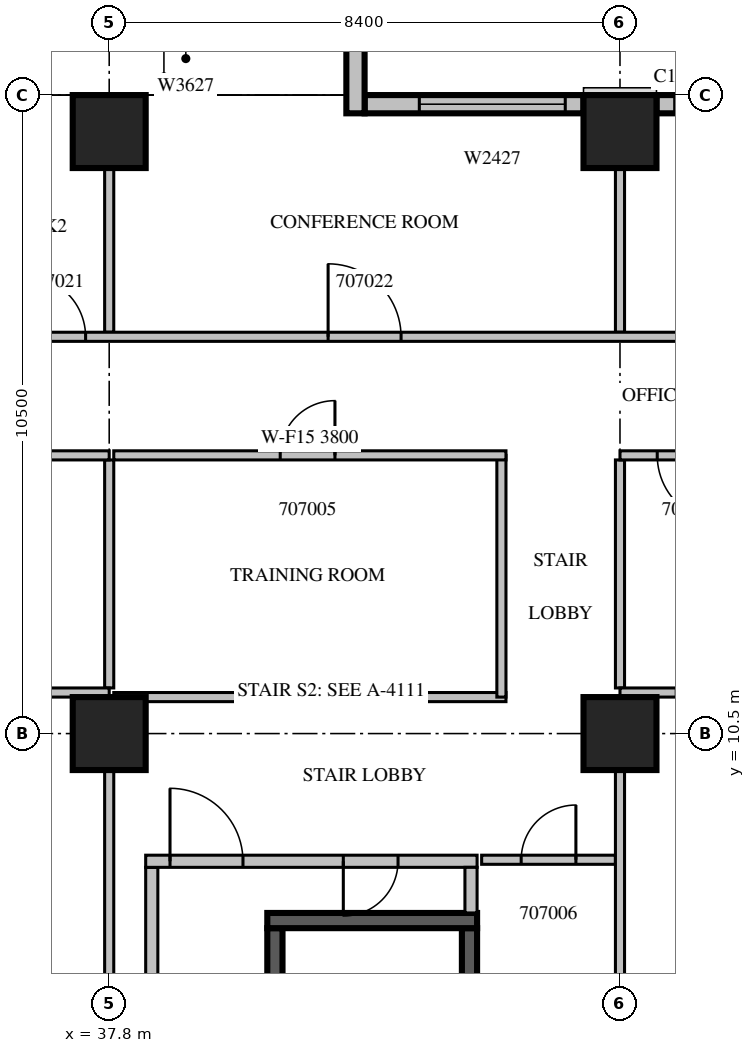
"""IFC4 building model, lengths in metres.
Left out: names, types, materials, properties, quantities, classifications, styles, units other than length and angle.
Written with IfcOpenShell. Run it as: python <this file> out.ifc"""

import sys

from ifc_helpers import new_model, si_unit, direction, frame, frame_2d, origin, origin_2d, place, context, subcontext, project, spatial, rectangle, extrude, source, transform, mapped, element, fill, save


model = new_model("IFC4")
c1 = context("Model", 3, precision=1e-05, world=origin(), true_north=direction((0.0, 1.0)))
c2 = subcontext(c1, "Body", "Model", "MODEL_VIEW")
j1 = project(units=[si_unit("LENGTHUNIT", "METRE"), si_unit("PLANEANGLEUNIT", "RADIAN")], contexts=[c1])
p1 = place(None, origin())
s1 = spatial("IfcSite", under=j1, at=p1, CompositionType="ELEMENT")
p2 = place(p1, origin())
s2 = spatial("IfcBuilding", under=s1, at=p2, CompositionType="ELEMENT")
p3 = place(p2, frame((0.0, 0.0, 40.5)))
s3 = spatial("IfcBuildingStorey", under=s2, at=p3, CompositionType="ELEMENT", Elevation=40.5)
m1 = source(origin(), c2, "Body", "SweptSolid", [
    extrude(rectangle(XDim=1.2, YDim=1.2, at=origin_2d()), origin(), (0.0, 0.0, 1.0), 4.2),
])
for number, where, z_axis, x_axis in (
    (1, (37.8, 10.5, 0.0), (0.0, 0.0, 1.0), (1.0, 0.0, 0.0)),
    (2, (46.2, 10.5, 0.0), (0.0, 0.0, 1.0), (1.0, 0.0, 0.0)),
    (3, (37.8, 20.4, 0.0), (0.0, 0.0, 1.0), (1.0, 0.0, 0.0)),
    (4, (46.2, 20.4, 0.0), (0.0, 0.0, 1.0), (1.0, 0.0, 0.0)),
):
    element("IfcColumn", number, at=place(p3, frame(where, z_axis=z_axis, x_axis=x_axis)), inside=s3, PredefinedType="COLUMN", context=c2, shape_type="MappedRepresentation", body=[
        mapped(m1, transform((0.0, 0.0, 0.0), scale=1.0)),
    ])
m2 = source(origin(), c2, "Body", "SweptSolid", [
    extrude(rectangle(XDim=4.68, YDim=0.3, at=frame_2d((2.34, 0.0))), origin(), (0.0, 0.0, 1.0), 3.8),
])
p4 = place(p3, frame((51.48, 20.85, 0.0), z_axis=(0.0, 0.0, 1.0), x_axis=(-1.0, 0.0, 0.0)))
e5 = element("IfcWall", 5, at=p4, inside=s3, PredefinedType="STANDARD", context=c2, shape_type="MappedRepresentation", body=[
    mapped(m2, transform((0.0, 0.0, 0.0), scale=1.0)),
])
m3 = source(origin(), c2, "Body", "SweptSolid", [
    extrude(rectangle(XDim=2.4, YDim=2.7, at=frame_2d((1.2, 1.35))), frame((0.0, 0.16, 0.0), z_axis=(0.0, -1.0, 0.0), x_axis=(1.0, 0.0, 0.0)), (0.0, 0.0, 1.0), 0.32),
])
p5 = place(p4, frame((1.98, 0.0, 0.6)))
e6 = element("IfcOpeningElement", 6, at=p5, cuts=e5, PredefinedType="OPENING", context=c2, shape_type="MappedRepresentation", body=[
    mapped(m3, transform((0.0, 0.0, 0.0), scale=1.0)),
])
p6 = place(p3, frame((45.6, 20.85, 0.0), z_axis=(0.0, 0.0, 1.0), x_axis=(-1.0, 0.0, 0.0)))
e7 = element("IfcWall", 7, at=p6, inside=s3, PredefinedType="STANDARD", context=c2, shape_type="SweptSolid", body=[
    extrude(rectangle(XDim=3.6, YDim=0.3, at=frame_2d((1.8, 0.0))), origin(), (0.0, 0.0, 1.0), 3.8),
])
p7 = place(p6, frame((0.3, 0.0, 0.6)))
e8 = element("IfcOpeningElement", 8, at=p7, cuts=e7, PredefinedType="OPENING", context=c2, shape_type="MappedRepresentation", body=[
    mapped(m3, transform((0.0, 0.0, 0.0), scale=1.0)),
])
m4 = source(origin(), c2, "Body", "SweptSolid", [
    extrude(rectangle(XDim=1.2, YDim=0.3, at=frame_2d((0.6, 0.0))), origin(), (0.0, 0.0, 1.0), 3.8),
])
p8 = place(p3, frame((41.85, 20.7, 0.0), z_axis=(0.0, 0.0, 1.0), x_axis=(0.0, 1.0, 0.0)))
e9 = element("IfcWall", 9, at=p8, inside=s3, PredefinedType="STANDARD", context=c2, shape_type="MappedRepresentation", body=[
    mapped(m4, transform((0.0, 0.0, 0.0), scale=1.0)),
])
p9 = place(p3, frame((40.525, 0.3, 0.0), z_axis=(0.0, 0.0, 1.0), x_axis=(0.0, 1.0, 0.0)))
e10 = element("IfcWall", 10, at=p9, inside=s3, PredefinedType="SOLIDWALL", context=c2, shape_type="SweptSolid", body=[
    extrude(rectangle(XDim=7.0, YDim=0.25, at=frame_2d((3.5, 0.0))), origin(), (0.0, 0.0, 1.0), 3.8),
])
m5 = source(origin(), c2, "Body", "SweptSolid", [
    extrude(rectangle(XDim=1.1, YDim=2.1, at=frame_2d((0.55, 1.05))), frame((0.0, 0.135, 0.0), z_axis=(0.0, -1.0, 0.0), x_axis=(1.0, 0.0, 0.0)), (0.0, 0.0, 1.0), 0.27),
])
p10 = place(p9, frame((0.55, 0.0, 0.0)))
e11 = element("IfcOpeningElement", 11, at=p10, cuts=e10, PredefinedType="OPENING", context=c2, shape_type="MappedRepresentation", body=[
    mapped(m5, transform((0.0, 0.0, 0.0), scale=1.0)),
])
m6 = source(origin(), c2, "Body", "SweptSolid", [
    extrude(rectangle(XDim=7.0, YDim=0.25, at=frame_2d((3.5, 0.0))), origin(), (0.0, 0.0, 1.0), 3.8),
])
p11 = place(p3, frame((43.725, 0.3, 0.0), z_axis=(0.0, 0.0, 1.0), x_axis=(0.0, 1.0, 0.0)))
e12 = element("IfcWall", 12, at=p11, inside=s3, PredefinedType="SOLIDWALL", context=c2, shape_type="MappedRepresentation", body=[
    mapped(m6, transform((0.0, 0.0, 0.0), scale=1.0)),
])
p12 = place(p3, frame((40.4, 7.425, 0.0), z_axis=(0.0, 0.0, 1.0), x_axis=(1.0, 0.0, 0.0)))
e13 = element("IfcWall", 13, at=p12, inside=s3, PredefinedType="SOLIDWALL", context=c2, shape_type="SweptSolid", body=[
    extrude(rectangle(XDim=3.45, YDim=0.25, at=frame_2d((1.725, 0.0))), origin(), (0.0, 0.0, 1.0), 3.8),
])
p13 = place(p3, frame((38.5, 0.3, 0.0), z_axis=(0.0, 0.0, 1.0), x_axis=(0.0, 1.0, 0.0)))
e14 = element("IfcWall", 14, at=p13, inside=s3, PredefinedType="PARTITIONING", context=c2, shape_type="SweptSolid", body=[
    extrude(rectangle(XDim=8.0, YDim=0.2, at=frame_2d((4.0, 0.0))), origin(), (0.0, 0.0, 1.0), 3.8),
])
p14 = place(p3, frame((38.4, 8.4, 0.0), z_axis=(0.0, 0.0, 1.0), x_axis=(1.0, 0.0, 0.0)))
e15 = element("IfcWall", 15, at=p14, inside=s3, PredefinedType="PARTITIONING", context=c2, shape_type="SweptSolid", body=[
    extrude(rectangle(XDim=5.45, YDim=0.2, at=frame_2d((2.725, 0.0))), origin(), (0.0, 0.0, 1.0), 3.8),
])
m7 = source(origin(), c2, "Body", "SweptSolid", [
    extrude(rectangle(XDim=1.2, YDim=2.1, at=frame_2d((0.6, 1.05))), frame((0.0, 0.11, 0.0), z_axis=(0.0, -1.0, 0.0), x_axis=(1.0, 0.0, 0.0)), (0.0, 0.0, 1.0), 0.22),
])
p15 = place(p14, frame((0.4, 0.0, 0.0)))
e16 = element("IfcOpeningElement", 16, at=p15, cuts=e15, PredefinedType="OPENING", context=c2, shape_type="MappedRepresentation", body=[
    mapped(m7, transform((0.0, 0.0, 0.0), scale=1.0)),
])
m8 = source(origin(), c2, "Body", "SweptSolid", [
    extrude(rectangle(XDim=0.9, YDim=2.1, at=frame_2d((0.45, 1.05))), frame((0.0, 0.11, 0.0), z_axis=(0.0, -1.0, 0.0), x_axis=(1.0, 0.0, 0.0)), (0.0, 0.0, 1.0), 0.22),
])
p16 = place(p14, frame((3.25, 0.0, 0.0)))
e17 = element("IfcOpeningElement", 17, at=p16, cuts=e15, PredefinedType="OPENING", context=c2, shape_type="MappedRepresentation", body=[
    mapped(m8, transform((0.0, 0.0, 0.0), scale=1.0)),
])
p17 = place(p3, frame((43.75, 7.55, 0.0), z_axis=(0.0, 0.0, 1.0), x_axis=(0.0, 1.0, 0.0)))
e18 = element("IfcWall", 18, at=p17, inside=s3, PredefinedType="PARTITIONING", context=c2, shape_type="SweptSolid", body=[
    extrude(rectangle(XDim=0.75, YDim=0.2, at=frame_2d((0.375, 0.0))), origin(), (0.0, 0.0, 1.0), 3.8),
])
p18 = place(p3, frame((37.875, 11.1, 0.0), z_axis=(0.0, 0.0, 1.0), x_axis=(1.0, 0.0, 0.0)))
e19 = element("IfcWall", 19, at=p18, inside=s3, PredefinedType="PARTITIONING", context=c2, shape_type="SweptSolid", body=[
    extrude(rectangle(XDim=6.45, YDim=0.15, at=frame_2d((3.225, 0.0))), origin(), (0.0, 0.0, 1.0), 3.8),
])
p19 = place(p3, frame((44.25, 11.1, 0.0), z_axis=(0.0, 0.0, 1.0), x_axis=(0.0, 1.0, 0.0)))
e20 = element("IfcWall", 20, at=p19, inside=s3, PredefinedType="PARTITIONING", context=c2, shape_type="SweptSolid", body=[
    extrude(rectangle(XDim=3.975, YDim=0.15, at=frame_2d((1.988, 0.0))), origin(), (0.0, 0.0, 1.0), 3.8),
])
m9 = source(origin(), c2, "Body", "SweptSolid", [
    extrude(rectangle(XDim=6.45, YDim=0.15, at=frame_2d((3.225, 0.0))), origin(), (0.0, 0.0, 1.0), 3.8),
])
p20 = place(p3, frame((44.325, 15.075, 0.0), z_axis=(0.0, 0.0, 1.0), x_axis=(-1.0, 0.0, 0.0)))
e21 = element("IfcWall", 21, at=p20, inside=s3, PredefinedType="PARTITIONING", context=c2, shape_type="MappedRepresentation", body=[
    mapped(m9, transform((0.0, 0.0, 0.0), scale=1.0)),
])
m10 = source(origin(), c2, "Body", "SweptSolid", [
    extrude(rectangle(XDim=0.9, YDim=2.1, at=frame_2d((0.45, 1.05))), frame((0.0, 0.085, 0.0), z_axis=(0.0, -1.0, 0.0), x_axis=(1.0, 0.0, 0.0)), (0.0, 0.0, 1.0), 0.17),
])
p21 = place(p20, frame((2.812, 0.0, 0.0)))
e22 = element("IfcOpeningElement", 22, at=p21, cuts=e21, PredefinedType="OPENING", context=c2, shape_type="MappedRepresentation", body=[
    mapped(m10, transform((0.0, 0.0, 0.0), scale=1.0)),
])
p22 = place(p3, frame((46.125, 8.425, 0.0), z_axis=(0.0, 0.0, 1.0), x_axis=(-1.0, 0.0, 0.0)))
e23 = element("IfcWall", 23, at=p22, inside=s3, PredefinedType="PARTITIONING", context=c2, shape_type="SweptSolid", body=[
    extrude(rectangle(XDim=2.2, YDim=0.15, at=frame_2d((1.1, 0.0))), origin(), (0.0, 0.0, 1.0), 3.8),
])
p23 = place(p22, frame((0.65, 0.0, 0.0)))
e24 = element("IfcOpeningElement", 24, at=p23, cuts=e23, PredefinedType="OPENING", context=c2, shape_type="MappedRepresentation", body=[
    mapped(m10, transform((0.0, 0.0, 0.0), scale=1.0)),
])
p24 = place(p3, frame((37.8, 1.199, 0.0), z_axis=(0.0, 0.0, 1.0), x_axis=(0.0, 1.0, 0.0)))
e25 = element("IfcWall", 25, at=p24, inside=s3, PredefinedType="PARTITIONING", context=c2, shape_type="SweptSolid", body=[
    extrude(rectangle(XDim=8.702, YDim=0.15, at=frame_2d((4.351, 0.0))), origin(), (0.0, 0.0, 1.0), 3.8),
])
p25 = place(p3, frame((37.8, 11.25, 0.0), z_axis=(0.0, 0.0, 1.0), x_axis=(0.0, 1.0, 0.0)))
e26 = element("IfcWall", 26, at=p25, inside=s3, PredefinedType="PARTITIONING", context=c2, shape_type="SweptSolid", body=[
    extrude(rectangle(XDim=3.75, YDim=0.15, at=frame_2d((1.875, 0.0))), origin(), (0.0, 0.0, 1.0), 3.8),
])
p26 = place(p3, frame((37.8, 11.175, 0.0), z_axis=(0.0, 0.0, 1.0), x_axis=(-1.0, 0.0, 0.0)))
e27 = element("IfcWall", 27, at=p26, inside=s3, PredefinedType="PARTITIONING", context=c2, shape_type="SweptSolid", body=[
    extrude(rectangle(XDim=8.4, YDim=0.15, at=frame_2d((4.2, 0.0))), origin(), (0.0, 0.0, 1.0), 3.8),
])
p27 = place(p26, frame((5.537, 0.0, 0.0)))
e28 = element("IfcOpeningElement", 28, at=p27, cuts=e27, PredefinedType="OPENING", context=c2, shape_type="MappedRepresentation", body=[
    mapped(m10, transform((0.0, 0.0, 0.0), scale=1.0)),
])
p28 = place(p26, frame((1.913, 0.0, 0.0)))
e29 = element("IfcOpeningElement", 29, at=p28, cuts=e27, PredefinedType="OPENING", context=c2, shape_type="MappedRepresentation", body=[
    mapped(m10, transform((0.0, 0.0, 0.0), scale=1.0)),
])
m11 = source(origin(), c2, "Body", "SweptSolid", [
    extrude(rectangle(XDim=8.702, YDim=0.15, at=frame_2d((4.351, 0.0))), origin(), (0.0, 0.0, 1.0), 3.8),
])
p29 = place(p3, frame((46.2, 1.199, 0.0), z_axis=(0.0, 0.0, 1.0), x_axis=(0.0, 1.0, 0.0)))
e30 = element("IfcWall", 30, at=p29, inside=s3, PredefinedType="PARTITIONING", context=c2, shape_type="MappedRepresentation", body=[
    mapped(m11, transform((0.0, 0.0, 0.0), scale=1.0)),
])
m12 = source(origin(), c2, "Body", "SweptSolid", [
    extrude(rectangle(XDim=3.75, YDim=0.15, at=frame_2d((1.875, 0.0))), origin(), (0.0, 0.0, 1.0), 3.8),
])
p30 = place(p3, frame((46.2, 11.25, 0.0), z_axis=(0.0, 0.0, 1.0), x_axis=(0.0, 1.0, 0.0)))
e31 = element("IfcWall", 31, at=p30, inside=s3, PredefinedType="PARTITIONING", context=c2, shape_type="MappedRepresentation", body=[
    mapped(m12, transform((0.0, 0.0, 0.0), scale=1.0)),
])
p31 = place(p3, frame((71.1, 11.175, 0.0), z_axis=(0.0, 0.0, 1.0), x_axis=(-1.0, 0.0, 0.0)))
e32 = element("IfcWall", 32, at=p31, inside=s3, PredefinedType="PARTITIONING", context=c2, shape_type="SweptSolid", body=[
    extrude(rectangle(XDim=24.9, YDim=0.15, at=frame_2d((12.45, 0.0))), origin(), (0.0, 0.0, 1.0), 3.8),
])
m13 = source(origin(), c2, "Body", "SweptSolid", [
    extrude(rectangle(XDim=1.1, YDim=2.1, at=frame_2d((0.55, 1.05))), frame((0.0, 0.085, 0.0), z_axis=(0.0, -1.0, 0.0), x_axis=(1.0, 0.0, 0.0)), (0.0, 0.0, 1.0), 0.17),
])
p32 = place(p31, frame((22.875, 0.0, 0.0)))
e33 = element("IfcOpeningElement", 33, at=p32, cuts=e32, PredefinedType="OPENING", context=c2, shape_type="MappedRepresentation", body=[
    mapped(m13, transform((0.0, 0.0, 0.0), scale=1.0)),
])
p33 = place(p31, frame((15.633, 0.0, 0.0)))
e34 = element("IfcOpeningElement", 34, at=p33, cuts=e32, PredefinedType="OPENING", context=c2, shape_type="MappedRepresentation", body=[
    mapped(m10, transform((0.0, 0.0, 0.0), scale=1.0)),
])
p34 = place(p31, frame((9.752, 0.0, 0.0)))
e35 = element("IfcOpeningElement", 35, at=p34, cuts=e32, PredefinedType="OPENING", context=c2, shape_type="MappedRepresentation", body=[
    mapped(m10, transform((0.0, 0.0, 0.0), scale=1.0)),
])
p35 = place(p31, frame((4.607, 0.0, 0.0)))
e36 = element("IfcOpeningElement", 36, at=p35, cuts=e32, PredefinedType="OPENING", context=c2, shape_type="MappedRepresentation", body=[
    mapped(m10, transform((0.0, 0.0, 0.0), scale=1.0)),
])
p36 = place(p31, frame((2.243, 0.0, 0.0)))
e37 = element("IfcOpeningElement", 37, at=p36, cuts=e32, PredefinedType="OPENING", context=c2, shape_type="MappedRepresentation", body=[
    mapped(m10, transform((0.0, 0.0, 0.0), scale=1.0)),
])
m14 = source(origin(), c2, "Body", "SweptSolid", [
    extrude(rectangle(XDim=2.701, YDim=0.15, at=frame_2d((1.351, 0.0))), origin(), (0.0, 0.0, 1.0), 3.8),
])
for number, where, z_axis, x_axis in (
    (38, (37.8, 17.1, 0.0), (0.0, 0.0, 1.0), (0.0, 1.0, 0.0)),
    (39, (46.2, 17.1, 0.0), (0.0, 0.0, 1.0), (0.0, 1.0, 0.0)),
):
    element("IfcWall", number, at=place(p3, frame(where, z_axis=z_axis, x_axis=x_axis)), inside=s3, PredefinedType="PARTITIONING", context=c2, shape_type="MappedRepresentation", body=[
        mapped(m14, transform((0.0, 0.0, 0.0), scale=1.0)),
    ])
m15 = source(origin(), c2, "Body", "SweptSolid", [
    extrude(rectangle(XDim=8.4, YDim=0.15, at=frame_2d((4.2, 0.0))), origin(), (0.0, 0.0, 1.0), 3.8),
])
p37 = place(p3, frame((37.8, 15.075, 0.0), z_axis=(0.0, 0.0, 1.0), x_axis=(-1.0, 0.0, 0.0)))
e40 = element("IfcWall", 40, at=p37, inside=s3, PredefinedType="PARTITIONING", context=c2, shape_type="MappedRepresentation", body=[
    mapped(m15, transform((0.0, 0.0, 0.0), scale=1.0)),
])
p38 = place(p37, frame((3.6, 0.0, 0.0)))
e41 = element("IfcOpeningElement", 41, at=p38, cuts=e40, PredefinedType="OPENING", context=c2, shape_type="SweptSolid", body=[
    extrude(rectangle(XDim=1.2, YDim=2.1, at=frame_2d((0.6, 1.05))), frame((0.0, 0.085, 0.0), z_axis=(0.0, -1.0, 0.0), x_axis=(1.0, 0.0, 0.0)), (0.0, 0.0, 1.0), 0.17),
])
m16 = source(origin(), c2, "Body", "SweptSolid", [
    extrude(rectangle(XDim=24.9, YDim=0.15, at=frame_2d((12.45, 0.0))), origin(), (0.0, 0.0, 1.0), 3.8),
])
p39 = place(p3, frame((71.1, 15.075, 0.0), z_axis=(0.0, 0.0, 1.0), x_axis=(-1.0, 0.0, 0.0)))
e42 = element("IfcWall", 42, at=p39, inside=s3, PredefinedType="PARTITIONING", context=c2, shape_type="MappedRepresentation", body=[
    mapped(m16, transform((0.0, 0.0, 0.0), scale=1.0)),
])
p40 = place(p39, frame((23.188, 0.0, 0.0)))
e43 = element("IfcOpeningElement", 43, at=p40, cuts=e42, PredefinedType="OPENING", context=c2, shape_type="SweptSolid", body=[
    extrude(rectangle(XDim=1.1, YDim=2.1, at=frame_2d((0.55, 1.05))), frame((0.0, 0.085, 0.0), z_axis=(0.0, -1.0, 0.0), x_axis=(1.0, 0.0, 0.0)), (0.0, 0.0, 1.0), 0.17),
])
p41 = place(p39, frame((20.348, 0.0, 0.0)))
e44 = element("IfcOpeningElement", 44, at=p41, cuts=e42, PredefinedType="OPENING", context=c2, shape_type="MappedRepresentation", body=[
    mapped(m10, transform((0.0, 0.0, 0.0), scale=1.0)),
])
m17 = source(origin(), c2, "Body", "SweptSolid", [
    extrude(rectangle(XDim=1.2, YDim=2.1, at=frame_2d((0.6, 1.05))), frame((0.0, 0.085, 0.0), z_axis=(0.0, -1.0, 0.0), x_axis=(1.0, 0.0, 0.0)), (0.0, 0.0, 1.0), 0.17),
])
p42 = place(p39, frame((12.54, 0.0, 0.0)))
e45 = element("IfcOpeningElement", 45, at=p42, cuts=e42, PredefinedType="OPENING", context=c2, shape_type="MappedRepresentation", body=[
    mapped(m17, transform((0.0, 0.0, 0.0), scale=1.0)),
])
p43 = place(p39, frame((2.993, 0.0, 0.0)))
e46 = element("IfcOpeningElement", 46, at=p43, cuts=e42, PredefinedType="OPENING", context=c2, shape_type="MappedRepresentation", body=[
    mapped(m17, transform((0.0, 0.0, 0.0), scale=1.0)),
])
p44 = place(p3, frame((29.4, 17.025, 0.0), z_axis=(0.0, 0.0, 1.0), x_axis=(1.0, 0.0, 0.0)))
e47 = element("IfcWall", 47, at=p44, inside=s3, PredefinedType="PARTITIONING", context=c2, shape_type="SweptSolid", body=[
    extrude(rectangle(XDim=37.5, YDim=0.15, at=frame_2d((18.75, 0.0))), origin(), (0.0, 0.0, 1.0), 3.8),
])
m18 = source(origin(), c2, "Body", "SweptSolid", [
    extrude(rectangle(XDim=1.0, YDim=2.1, at=frame_2d((0.5, 1.05))), frame((0.0, 0.085, 0.0), z_axis=(0.0, -1.0, 0.0), x_axis=(1.0, 0.0, 0.0)), (0.0, 0.0, 1.0), 0.17),
])
p45 = place(p44, frame((1.357, 0.0, 0.0)))
e48 = element("IfcOpeningElement", 48, at=p45, cuts=e47, PredefinedType="OPENING", context=c2, shape_type="MappedRepresentation", body=[
    mapped(m18, transform((0.0, 0.0, 0.0), scale=1.0)),
])
p46 = place(p44, frame((4.669, 0.0, 0.0)))
e49 = element("IfcOpeningElement", 49, at=p46, cuts=e47, PredefinedType="OPENING", context=c2, shape_type="MappedRepresentation", body=[
    mapped(m18, transform((0.0, 0.0, 0.0), scale=1.0)),
])
p47 = place(p44, frame((7.012, 0.0, 0.0)))
e50 = element("IfcOpeningElement", 50, at=p47, cuts=e47, PredefinedType="OPENING", context=c2, shape_type="MappedRepresentation", body=[
    mapped(m18, transform((0.0, 0.0, 0.0), scale=1.0)),
])
p48 = place(p44, frame((12.0, 0.0, 0.0)))
e51 = element("IfcOpeningElement", 51, at=p48, cuts=e47, PredefinedType="OPENING", context=c2, shape_type="MappedRepresentation", body=[
    mapped(m17, transform((0.0, 0.0, 0.0), scale=1.0)),
])
p49 = place(p44, frame((19.24, 0.0, 0.0)))
e52 = element("IfcOpeningElement", 52, at=p49, cuts=e47, PredefinedType="OPENING", context=c2, shape_type="MappedRepresentation", body=[
    mapped(m18, transform((0.0, 0.0, 0.0), scale=1.0)),
])
p50 = place(p44, frame((25.17, 0.0, 0.0)))
e53 = element("IfcOpeningElement", 53, at=p50, cuts=e47, PredefinedType="OPENING", context=c2, shape_type="MappedRepresentation", body=[
    mapped(m10, transform((0.0, 0.0, 0.0), scale=1.0)),
])
p51 = place(p44, frame((30.052, 0.0, 0.0)))
e54 = element("IfcOpeningElement", 54, at=p51, cuts=e47, PredefinedType="OPENING", context=c2, shape_type="MappedRepresentation", body=[
    mapped(m18, transform((0.0, 0.0, 0.0), scale=1.0)),
])
p52 = place(p44, frame((33.608, 0.0, 0.0)))
e55 = element("IfcOpeningElement", 55, at=p52, cuts=e47, PredefinedType="OPENING", context=c2, shape_type="MappedRepresentation", body=[
    mapped(m18, transform((0.0, 0.0, 0.0), scale=1.0)),
])
p53 = place(p44, frame((36.124, 0.0, 0.0)))
e56 = element("IfcOpeningElement", 56, at=p53, cuts=e47, PredefinedType="OPENING", context=c2, shape_type="MappedRepresentation", body=[
    mapped(m18, transform((0.0, 0.0, 0.0), scale=1.0)),
])
m19 = source(origin(), c2, "Body", "SweptSolid", [
    extrude(rectangle(XDim=2.4, YDim=2.7, at=frame_2d((1.2, 1.35))), frame((0.0, 0.03, 0.0), z_axis=(0.0, -1.0, 0.0), x_axis=(1.0, 0.0, 0.0)), (0.0, 0.0, 1.0), 0.06),
])
p54 = place(p5, origin())
e57 = element("IfcWindow", 57, at=p54, inside=s3, PartitioningType="SINGLE_PANEL", PredefinedType="WINDOW", context=c2, shape_type="MappedRepresentation", body=[
    mapped(m19, transform((0.0, 0.0, 0.0), scale=1.0)),
])
fill(e6, e57)
p55 = place(p7, origin())
e58 = element("IfcWindow", 58, at=p55, inside=s3, PartitioningType="SINGLE_PANEL", PredefinedType="WINDOW", context=c2, shape_type="MappedRepresentation", body=[
    mapped(m19, transform((0.0, 0.0, 0.0), scale=1.0)),
])
fill(e8, e58)
m20 = source(origin(), c2, "Body", "SweptSolid", [
    extrude(rectangle(XDim=1.2, YDim=2.1, at=frame_2d((0.6, 1.05))), frame((0.0, 0.025, 0.0), z_axis=(0.0, -1.0, 0.0), x_axis=(1.0, 0.0, 0.0)), (0.0, 0.0, 1.0), 0.05),
])
p56 = place(p15, origin())
e59 = element("IfcDoor", 59, at=p56, inside=s3, OperationType="SINGLE_SWING_LEFT", PredefinedType="DOOR", context=c2, shape_type="MappedRepresentation", body=[
    mapped(m20, transform((0.0, 0.0, 0.0), scale=1.0)),
])
fill(e16, e59)
m21 = source(origin(), c2, "Body", "SweptSolid", [
    extrude(rectangle(XDim=0.9, YDim=2.1, at=frame_2d((0.45, 1.05))), frame((0.0, 0.025, 0.0), z_axis=(0.0, -1.0, 0.0), x_axis=(1.0, 0.0, 0.0)), (0.0, 0.0, 1.0), 0.05),
])
p57 = place(p16, origin())
e60 = element("IfcDoor", 60, at=p57, inside=s3, OperationType="SINGLE_SWING_RIGHT", PredefinedType="DOOR", context=c2, shape_type="MappedRepresentation", body=[
    mapped(m21, transform((0.0, 0.0, 0.0), scale=1.0)),
])
fill(e17, e60)
p58 = place(p21, origin())
e61 = element("IfcDoor", 61, at=p58, inside=s3, OperationType="SINGLE_SWING_RIGHT", PredefinedType="DOOR", context=c2, shape_type="MappedRepresentation", body=[
    mapped(m21, transform((0.0, 0.0, 0.0), scale=1.0)),
])
fill(e22, e61)
p59 = place(p23, origin())
e62 = element("IfcDoor", 62, at=p59, inside=s3, OperationType="SINGLE_SWING_RIGHT", PredefinedType="DOOR", context=c2, shape_type="MappedRepresentation", body=[
    mapped(m21, transform((0.0, 0.0, 0.0), scale=1.0)),
])
fill(e24, e62)
m22 = source(origin(), c2, "Body", "SweptSolid", [
    extrude(rectangle(XDim=1.1, YDim=2.1, at=frame_2d((0.55, 1.05))), frame((0.0, 0.025, 0.0), z_axis=(0.0, -1.0, 0.0), x_axis=(1.0, 0.0, 0.0)), (0.0, 0.0, 1.0), 0.05),
])
p60 = place(p40, origin())
e63 = element("IfcDoor", 63, at=p60, inside=s3, OperationType="SINGLE_SWING_LEFT", PredefinedType="DOOR", context=c2, shape_type="MappedRepresentation", body=[
    mapped(m22, transform((0.0, 0.0, 0.0), scale=1.0)),
])
fill(e43, e63)
p61 = place(p32, origin())
e64 = element("IfcDoor", 64, at=p61, inside=s3, OperationType="SINGLE_SWING_RIGHT", PredefinedType="DOOR", context=c2, shape_type="MappedRepresentation", body=[
    mapped(m22, transform((0.0, 0.0, 0.0), scale=1.0)),
])
fill(e33, e64)
m23 = source(origin(), c2, "Body", "SweptSolid", [
    extrude(rectangle(XDim=1.0, YDim=2.1, at=frame_2d((0.5, 1.05))), frame((0.0, 0.025, 0.0), z_axis=(0.0, -1.0, 0.0), x_axis=(1.0, 0.0, 0.0)), (0.0, 0.0, 1.0), 0.05),
])
p62 = place(p47, origin())
e65 = element("IfcDoor", 65, at=p62, inside=s3, OperationType="SINGLE_SWING_LEFT", PredefinedType="DOOR", context=c2, shape_type="MappedRepresentation", body=[
    mapped(m23, transform((0.0, 0.0, 0.0), scale=1.0)),
])
fill(e50, e65)
p63 = place(p48, origin())
e66 = element("IfcDoor", 66, at=p63, inside=s3, OperationType="SINGLE_SWING_LEFT", PredefinedType="DOOR", context=c2, shape_type="MappedRepresentation", body=[
    mapped(m20, transform((0.0, 0.0, 0.0), scale=1.0)),
])
fill(e51, e66)
save(model, sys.argv[1])
